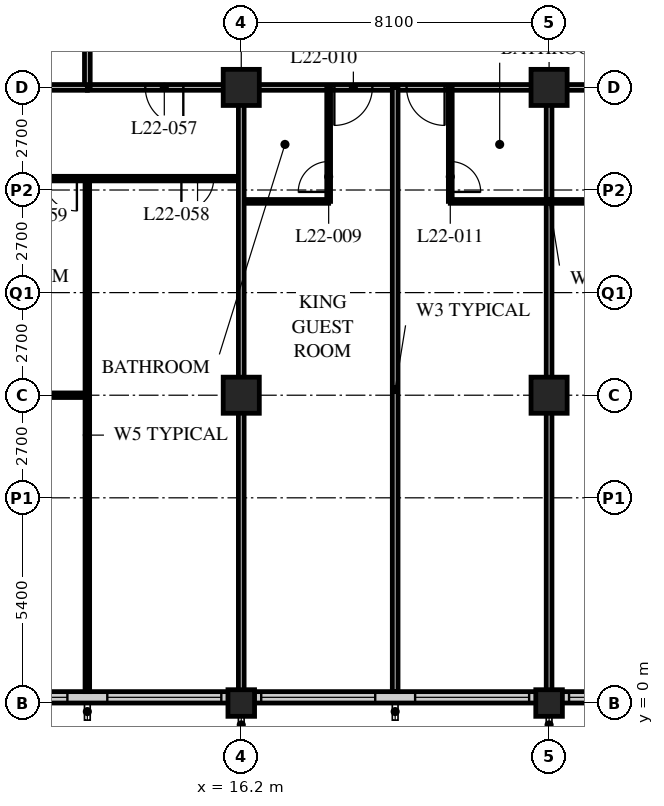
"""IFC4 building model, lengths in metres.
Left out: names, types, materials, properties, quantities, classifications, styles, units other than length and angle.
Written with IfcOpenShell. Run it as: python <this file> out.ifc"""

import sys

from ifc_helpers import new_model, si_unit, direction, frame, frame_2d, origin, origin_2d, place, context, subcontext, project, spatial, rectangle, hollow_rectangle, extrude, element, fill, save


model = new_model("IFC4")
c1 = context("Model", 3, precision=1e-05, world=origin(), true_north=direction((0.0, 1.0)))
c2 = subcontext(c1, "Body", "Model", "MODEL_VIEW")
j1 = project(units=[si_unit("LENGTHUNIT", "METRE"), si_unit("PLANEANGLEUNIT", "RADIAN")], contexts=[c1])
p1 = place(None, origin())
s1 = spatial("IfcSite", under=j1, at=p1, CompositionType="ELEMENT")
p2 = place(p1, origin())
s2 = spatial("IfcBuilding", under=s1, at=p2, CompositionType="ELEMENT")
p3 = place(p2, frame((0.0, 0.0, 87.4)))
s3 = spatial("IfcBuildingStorey", under=s2, at=p3, CompositionType="ELEMENT", Elevation=87.4)
p4 = place(p3, frame((16.2, 0.0, 0.0), z_axis=(0.0, 0.0, 1.0), x_axis=(1.0, 0.0, 0.0)))
e1 = element("IfcColumn", 1, at=p4, inside=s3, PredefinedType="COLUMN", context=c2, shape_type="SweptSolid", body=[
    extrude(hollow_rectangle(XDim=0.7, YDim=0.7, WallThickness=0.06, at=origin_2d()), origin(), (0.0, 0.0, 1.0), 3.4),
])
for number, where, z_axis, x_axis in (
    (2, (16.2, 8.1, 0.0), (0.0, 0.0, 1.0), (1.0, 0.0, 0.0)),
    (3, (16.2, 16.2, 0.0), (0.0, 0.0, 1.0), (1.0, 0.0, 0.0)),
):
    element("IfcColumn", number, at=place(p3, frame(where, z_axis=z_axis, x_axis=x_axis)), inside=s3, PredefinedType="COLUMN", context=c2, shape_type="SweptSolid", body=[
        extrude(hollow_rectangle(XDim=0.95, YDim=0.95, WallThickness=0.095, at=origin_2d()), origin(), (0.0, 0.0, 1.0), 3.4),
    ])
p5 = place(p3, frame((24.3, 0.0, 0.0), z_axis=(0.0, 0.0, 1.0), x_axis=(1.0, 0.0, 0.0)))
e4 = element("IfcColumn", 4, at=p5, inside=s3, PredefinedType="COLUMN", context=c2, shape_type="SweptSolid", body=[
    extrude(hollow_rectangle(XDim=0.7, YDim=0.7, WallThickness=0.06, at=origin_2d()), origin(), (0.0, 0.0, 1.0), 3.4),
])
for number, where, z_axis, x_axis in (
    (5, (24.3, 8.1, 0.0), (0.0, 0.0, 1.0), (1.0, 0.0, 0.0)),
    (6, (24.3, 16.2, 0.0), (0.0, 0.0, 1.0), (1.0, 0.0, 0.0)),
):
    element("IfcColumn", number, at=place(p3, frame(where, z_axis=z_axis, x_axis=x_axis)), inside=s3, PredefinedType="COLUMN", context=c2, shape_type="SweptSolid", body=[
        extrude(hollow_rectangle(XDim=0.95, YDim=0.95, WallThickness=0.095, at=origin_2d()), origin(), (0.0, 0.0, 1.0), 3.4),
    ])
p6 = place(p3, frame((8.4, 0.15, 0.0), z_axis=(0.0, 0.0, 1.0), x_axis=(1.0, 0.0, 0.0)))
e7 = element("IfcWall", 7, at=p6, inside=s3, PredefinedType="SOLIDWALL", context=c2, shape_type="SweptSolid", body=[
    extrude(rectangle(XDim=40.2, YDim=0.3, at=frame_2d((20.1, 0.0))), origin(), (0.0, 0.0, 1.0), 2.05),
])
p7 = place(p6, frame((0.225, 0.0, 0.9)))
e8 = element("IfcOpeningElement", 8, at=p7, cuts=e7, PredefinedType="OPENING", context=c2, shape_type="SweptSolid", body=[
    extrude(rectangle(XDim=3.0, YDim=1.1, at=frame_2d((1.5, 0.55))), frame((0.0, 0.16, 0.0), z_axis=(0.0, -1.0, 0.0), x_axis=(1.0, 0.0, 0.0)), (0.0, 0.0, 1.0), 0.32),
])
p8 = place(p6, frame((4.275, 0.0, 0.9)))
e9 = element("IfcOpeningElement", 9, at=p8, cuts=e7, PredefinedType="OPENING", context=c2, shape_type="SweptSolid", body=[
    extrude(rectangle(XDim=3.0, YDim=1.1, at=frame_2d((1.5, 0.55))), frame((0.0, 0.16, 0.0), z_axis=(0.0, -1.0, 0.0), x_axis=(1.0, 0.0, 0.0)), (0.0, 0.0, 1.0), 0.32),
])
p9 = place(p6, frame((8.325, 0.0, 0.9)))
e10 = element("IfcOpeningElement", 10, at=p9, cuts=e7, PredefinedType="OPENING", context=c2, shape_type="SweptSolid", body=[
    extrude(rectangle(XDim=3.0, YDim=1.1, at=frame_2d((1.5, 0.55))), frame((0.0, 0.16, 0.0), z_axis=(0.0, -1.0, 0.0), x_axis=(1.0, 0.0, 0.0)), (0.0, 0.0, 1.0), 0.32),
])
p10 = place(p6, frame((12.375, 0.0, 0.9)))
e11 = element("IfcOpeningElement", 11, at=p10, cuts=e7, PredefinedType="OPENING", context=c2, shape_type="SweptSolid", body=[
    extrude(rectangle(XDim=3.0, YDim=1.1, at=frame_2d((1.5, 0.55))), frame((0.0, 0.16, 0.0), z_axis=(0.0, -1.0, 0.0), x_axis=(1.0, 0.0, 0.0)), (0.0, 0.0, 1.0), 0.32),
])
p11 = place(p6, frame((16.425, 0.0, 0.9)))
e12 = element("IfcOpeningElement", 12, at=p11, cuts=e7, PredefinedType="OPENING", context=c2, shape_type="SweptSolid", body=[
    extrude(rectangle(XDim=3.0, YDim=1.1, at=frame_2d((1.5, 0.55))), frame((0.0, 0.16, 0.0), z_axis=(0.0, -1.0, 0.0), x_axis=(1.0, 0.0, 0.0)), (0.0, 0.0, 1.0), 0.32),
])
p12 = place(p6, frame((20.475, 0.0, 0.9)))
e13 = element("IfcOpeningElement", 13, at=p12, cuts=e7, PredefinedType="OPENING", context=c2, shape_type="SweptSolid", body=[
    extrude(rectangle(XDim=3.0, YDim=1.1, at=frame_2d((1.5, 0.55))), frame((0.0, 0.16, 0.0), z_axis=(0.0, -1.0, 0.0), x_axis=(1.0, 0.0, 0.0)), (0.0, 0.0, 1.0), 0.32),
])
p13 = place(p6, frame((24.525, 0.0, 0.9)))
e14 = element("IfcOpeningElement", 14, at=p13, cuts=e7, PredefinedType="OPENING", context=c2, shape_type="SweptSolid", body=[
    extrude(rectangle(XDim=3.0, YDim=1.1, at=frame_2d((1.5, 0.55))), frame((0.0, 0.16, 0.0), z_axis=(0.0, -1.0, 0.0), x_axis=(1.0, 0.0, 0.0)), (0.0, 0.0, 1.0), 0.32),
])
p14 = place(p6, frame((28.575, 0.0, 0.9)))
e15 = element("IfcOpeningElement", 15, at=p14, cuts=e7, PredefinedType="OPENING", context=c2, shape_type="SweptSolid", body=[
    extrude(rectangle(XDim=3.0, YDim=1.1, at=frame_2d((1.5, 0.55))), frame((0.0, 0.16, 0.0), z_axis=(0.0, -1.0, 0.0), x_axis=(1.0, 0.0, 0.0)), (0.0, 0.0, 1.0), 0.32),
])
p15 = place(p6, frame((32.625, 0.0, 0.9)))
e16 = element("IfcOpeningElement", 16, at=p15, cuts=e7, PredefinedType="OPENING", context=c2, shape_type="SweptSolid", body=[
    extrude(rectangle(XDim=3.0, YDim=1.1, at=frame_2d((1.5, 0.55))), frame((0.0, 0.16, 0.0), z_axis=(0.0, -1.0, 0.0), x_axis=(1.0, 0.0, 0.0)), (0.0, 0.0, 1.0), 0.32),
])
p16 = place(p6, frame((36.675, 0.0, 0.9)))
e17 = element("IfcOpeningElement", 17, at=p16, cuts=e7, PredefinedType="OPENING", context=c2, shape_type="SweptSolid", body=[
    extrude(rectangle(XDim=3.0, YDim=1.1, at=frame_2d((1.5, 0.55))), frame((0.0, 0.16, 0.0), z_axis=(0.0, -1.0, 0.0), x_axis=(1.0, 0.0, 0.0)), (0.0, 0.0, 1.0), 0.32),
])
p17 = place(p3, frame((12.15, 16.2, 0.0), z_axis=(0.0, 0.0, 1.0), x_axis=(1.0, 0.0, 0.0)))
e18 = element("IfcWall", 18, at=p17, inside=s3, PredefinedType="PARTITIONING", context=c2, shape_type="SweptSolid", body=[
    extrude(rectangle(XDim=32.4, YDim=0.15, at=frame_2d((16.2, 0.0))), origin(), (0.0, 0.0, 1.0), 2.388),
])
p18 = place(p17, frame((6.5, 0.0, 0.0)))
e19 = element("IfcOpeningElement", 19, at=p18, cuts=e18, PredefinedType="OPENING", context=c2, shape_type="SweptSolid", body=[
    extrude(rectangle(XDim=1.0, YDim=2.1, at=frame_2d((0.5, 1.05))), frame((0.0, 0.085, 0.0), z_axis=(0.0, -1.0, 0.0), x_axis=(1.0, 0.0, 0.0)), (0.0, 0.0, 1.0), 0.17),
])
p19 = place(p17, frame((8.4, 0.0, 0.0)))
e20 = element("IfcOpeningElement", 20, at=p19, cuts=e18, PredefinedType="OPENING", context=c2, shape_type="SweptSolid", body=[
    extrude(rectangle(XDim=1.0, YDim=2.1, at=frame_2d((0.5, 1.05))), frame((0.0, 0.085, 0.0), z_axis=(0.0, -1.0, 0.0), x_axis=(1.0, 0.0, 0.0)), (0.0, 0.0, 1.0), 0.17),
])
p20 = place(p17, frame((14.9, 0.0, 0.0)))
e21 = element("IfcOpeningElement", 21, at=p20, cuts=e18, PredefinedType="OPENING", context=c2, shape_type="SweptSolid", body=[
    extrude(rectangle(XDim=1.0, YDim=2.1, at=frame_2d((0.5, 1.05))), frame((0.0, 0.085, 0.0), z_axis=(0.0, -1.0, 0.0), x_axis=(1.0, 0.0, 0.0)), (0.0, 0.0, 1.0), 0.17),
])
p21 = place(p17, frame((16.5, 0.0, 0.0)))
e22 = element("IfcOpeningElement", 22, at=p21, cuts=e18, PredefinedType="OPENING", context=c2, shape_type="SweptSolid", body=[
    extrude(rectangle(XDim=1.0, YDim=2.1, at=frame_2d((0.5, 1.05))), frame((0.0, 0.085, 0.0), z_axis=(0.0, -1.0, 0.0), x_axis=(1.0, 0.0, 0.0)), (0.0, 0.0, 1.0), 0.17),
])
p22 = place(p17, frame((23.0, 0.0, 0.0)))
e23 = element("IfcOpeningElement", 23, at=p22, cuts=e18, PredefinedType="OPENING", context=c2, shape_type="SweptSolid", body=[
    extrude(rectangle(XDim=1.0, YDim=2.1, at=frame_2d((0.5, 1.05))), frame((0.0, 0.085, 0.0), z_axis=(0.0, -1.0, 0.0), x_axis=(1.0, 0.0, 0.0)), (0.0, 0.0, 1.0), 0.17),
])
p23 = place(p17, frame((24.9, 0.0, 0.0)))
e24 = element("IfcOpeningElement", 24, at=p23, cuts=e18, PredefinedType="OPENING", context=c2, shape_type="SweptSolid", body=[
    extrude(rectangle(XDim=1.0, YDim=2.1, at=frame_2d((0.5, 1.05))), frame((0.0, 0.085, 0.0), z_axis=(0.0, -1.0, 0.0), x_axis=(1.0, 0.0, 0.0)), (0.0, 0.0, 1.0), 0.17),
])
p24 = place(p17, frame((1.525, 0.0, 0.0)))
e25 = element("IfcOpeningElement", 25, at=p24, cuts=e18, PredefinedType="OPENING", context=c2, shape_type="SweptSolid", body=[
    extrude(rectangle(XDim=1.0, YDim=2.1, at=frame_2d((0.5, 1.05))), frame((0.0, 0.085, 0.0), z_axis=(0.0, -1.0, 0.0), x_axis=(1.0, 0.0, 0.0)), (0.0, 0.0, 1.0), 0.17),
])
p25 = place(p17, frame((29.875, 0.0, 0.0)))
e26 = element("IfcOpeningElement", 26, at=p25, cuts=e18, PredefinedType="OPENING", context=c2, shape_type="SweptSolid", body=[
    extrude(rectangle(XDim=1.0, YDim=2.1, at=frame_2d((0.5, 1.05))), frame((0.0, 0.085, 0.0), z_axis=(0.0, -1.0, 0.0), x_axis=(1.0, 0.0, 0.0)), (0.0, 0.0, 1.0), 0.17),
])
p26 = place(p3, frame((12.15, 16.2, 0.0), z_axis=(0.0, 0.0, 1.0), x_axis=(0.0, 1.0, 0.0)))
e27 = element("IfcWall", 27, at=p26, inside=s3, PredefinedType="PARTITIONING", context=c2, shape_type="SweptSolid", body=[
    extrude(rectangle(XDim=26.1, YDim=0.15, at=frame_2d((13.05, 0.0))), origin(), (0.0, 0.0, 1.0), 3.15),
])
p27 = place(p26, frame((2.45, 0.0, 0.0)))
e28 = element("IfcOpeningElement", 28, at=p27, cuts=e27, PredefinedType="OPENING", context=c2, shape_type="SweptSolid", body=[
    extrude(rectangle(XDim=1.0, YDim=2.1, at=frame_2d((0.5, 1.05))), frame((0.0, 0.085, 0.0), z_axis=(0.0, -1.0, 0.0), x_axis=(1.0, 0.0, 0.0)), (0.0, 0.0, 1.0), 0.17),
])
p28 = place(p26, frame((6.5, 0.0, 0.0)))
e29 = element("IfcOpeningElement", 29, at=p28, cuts=e27, PredefinedType="OPENING", context=c2, shape_type="SweptSolid", body=[
    extrude(rectangle(XDim=1.0, YDim=2.1, at=frame_2d((0.5, 1.05))), frame((0.0, 0.085, 0.0), z_axis=(0.0, -1.0, 0.0), x_axis=(1.0, 0.0, 0.0)), (0.0, 0.0, 1.0), 0.17),
])
p29 = place(p26, frame((10.0, 0.0, 0.0)))
e30 = element("IfcOpeningElement", 30, at=p29, cuts=e27, PredefinedType="OPENING", context=c2, shape_type="SweptSolid", body=[
    extrude(rectangle(XDim=1.0, YDim=2.1, at=frame_2d((0.5, 1.05))), frame((0.0, 0.085, 0.0), z_axis=(0.0, -1.0, 0.0), x_axis=(1.0, 0.0, 0.0)), (0.0, 0.0, 1.0), 0.17),
])
p30 = place(p26, frame((18.1, 0.0, 0.0)))
e31 = element("IfcOpeningElement", 31, at=p30, cuts=e27, PredefinedType="OPENING", context=c2, shape_type="SweptSolid", body=[
    extrude(rectangle(XDim=1.0, YDim=2.1, at=frame_2d((0.5, 1.05))), frame((0.0, 0.085, 0.0), z_axis=(0.0, -1.0, 0.0), x_axis=(1.0, 0.0, 0.0)), (0.0, 0.0, 1.0), 0.17),
])
p31 = place(p3, frame((16.2, 13.2, 0.0), z_axis=(0.0, 0.0, 1.0), x_axis=(1.0, 0.0, 0.0)))
e32 = element("IfcWall", 32, at=p31, inside=s3, PredefinedType="PARTITIONING", context=c2, shape_type="SweptSolid", body=[
    extrude(rectangle(XDim=2.3, YDim=0.1, at=frame_2d((1.15, 0.0))), origin(), (0.0, 0.0, 1.0), 3.15),
])
p32 = place(p3, frame((18.5, 16.2, 0.0), z_axis=(0.0, 0.0, 1.0), x_axis=(0.0, -1.0, 0.0)))
e33 = element("IfcWall", 33, at=p32, inside=s3, PredefinedType="PARTITIONING", context=c2, shape_type="SweptSolid", body=[
    extrude(rectangle(XDim=3.0, YDim=0.1, at=frame_2d((1.5, 0.0))), origin(), (0.0, 0.0, 1.0), 3.15),
])
p33 = place(p32, frame((1.95, 0.0, 0.0)))
e34 = element("IfcOpeningElement", 34, at=p33, cuts=e33, PredefinedType="OPENING", context=c2, shape_type="SweptSolid", body=[
    extrude(rectangle(XDim=0.8, YDim=2.1, at=frame_2d((0.4, 1.05))), frame((0.0, 0.06, 0.0), z_axis=(0.0, -1.0, 0.0), x_axis=(1.0, 0.0, 0.0)), (0.0, 0.0, 1.0), 0.12),
])
p34 = place(p3, frame((20.25, 16.2, 0.0), z_axis=(0.0, 0.0, 1.0), x_axis=(0.0, -1.0, 0.0)))
e35 = element("IfcWall", 35, at=p34, inside=s3, PredefinedType="PARTITIONING", context=c2, shape_type="SweptSolid", body=[
    extrude(rectangle(XDim=15.9, YDim=0.15, at=frame_2d((7.95, 0.0))), origin(), (0.0, 0.0, 1.0), 3.15),
])
p35 = place(p3, frame((21.7, 13.2, 0.0), z_axis=(0.0, 0.0, 1.0), x_axis=(1.0, 0.0, 0.0)))
e36 = element("IfcWall", 36, at=p35, inside=s3, PredefinedType="PARTITIONING", context=c2, shape_type="SweptSolid", body=[
    extrude(rectangle(XDim=5.2, YDim=0.1, at=frame_2d((2.6, 0.0))), origin(), (0.0, 0.0, 1.0), 3.15),
])
p36 = place(p3, frame((21.7, 16.2, 0.0), z_axis=(0.0, 0.0, 1.0), x_axis=(0.0, -1.0, 0.0)))
e37 = element("IfcWall", 37, at=p36, inside=s3, PredefinedType="PARTITIONING", context=c2, shape_type="SweptSolid", body=[
    extrude(rectangle(XDim=3.0, YDim=0.1, at=frame_2d((1.5, 0.0))), origin(), (0.0, 0.0, 1.0), 3.15),
])
p37 = place(p36, frame((1.95, 0.0, 0.0)))
e38 = element("IfcOpeningElement", 38, at=p37, cuts=e37, PredefinedType="OPENING", context=c2, shape_type="SweptSolid", body=[
    extrude(rectangle(XDim=0.8, YDim=2.1, at=frame_2d((0.4, 1.05))), frame((0.0, 0.06, 0.0), z_axis=(0.0, -1.0, 0.0), x_axis=(1.0, 0.0, 0.0)), (0.0, 0.0, 1.0), 0.12),
])
p38 = place(p3, frame((24.3, 16.2, 0.0), z_axis=(0.0, 0.0, 1.0), x_axis=(0.0, -1.0, 0.0)))
e39 = element("IfcWall", 39, at=p38, inside=s3, PredefinedType="PARTITIONING", context=c2, shape_type="SweptSolid", body=[
    extrude(rectangle(XDim=15.9, YDim=0.15, at=frame_2d((7.95, 0.0))), origin(), (0.0, 0.0, 1.0), 2.05),
])
p39 = place(p3, frame((8.15, 13.8, 0.0), z_axis=(0.0, 0.0, 1.0), x_axis=(1.0, 0.0, 0.0)))
e40 = element("IfcWall", 40, at=p39, inside=s3, PredefinedType="PARTITIONING", context=c2, shape_type="SweptSolid", body=[
    extrude(rectangle(XDim=8.05, YDim=0.12, at=frame_2d((4.025, 0.0))), origin(), (0.0, 0.0, 1.0), 3.15),
])
p40 = place(p39, frame((6.475, 0.0, 0.0)))
e41 = element("IfcOpeningElement", 41, at=p40, cuts=e40, PredefinedType="OPENING", context=c2, shape_type="SweptSolid", body=[
    extrude(rectangle(XDim=0.85, YDim=2.1, at=frame_2d((0.425, 1.05))), frame((0.0, 0.07, 0.0), z_axis=(0.0, -1.0, 0.0), x_axis=(1.0, 0.0, 0.0)), (0.0, 0.0, 1.0), 0.14),
])
p41 = place(p39, frame((2.875, 0.0, 0.0)))
e42 = element("IfcOpeningElement", 42, at=p41, cuts=e40, PredefinedType="OPENING", context=c2, shape_type="SweptSolid", body=[
    extrude(rectangle(XDim=0.85, YDim=2.1, at=frame_2d((0.425, 1.05))), frame((0.0, 0.07, 0.0), z_axis=(0.0, -1.0, 0.0), x_axis=(1.0, 0.0, 0.0)), (0.0, 0.0, 1.0), 0.14),
])
p42 = place(p3, frame((12.15, 13.8, 0.0), z_axis=(0.0, 0.0, 1.0), x_axis=(0.0, -1.0, 0.0)))
e43 = element("IfcWall", 43, at=p42, inside=s3, PredefinedType="PARTITIONING", context=c2, shape_type="SweptSolid", body=[
    extrude(rectangle(XDim=13.5, YDim=0.12, at=frame_2d((6.75, 0.0))), origin(), (0.0, 0.0, 1.0), 3.15),
])
p43 = place(p3, frame((0.3, 16.2, 0.0), z_axis=(0.0, 0.0, 1.0), x_axis=(1.0, 0.0, 0.0)))
e44 = element("IfcWall", 44, at=p43, inside=s3, PredefinedType="PARTITIONING", context=c2, shape_type="SweptSolid", body=[
    extrude(rectangle(XDim=11.85, YDim=0.15, at=frame_2d((5.925, 0.0))), origin(), (0.0, 0.0, 1.0), 2.388),
])
p44 = place(p3, frame((16.2, 16.2, 0.0), z_axis=(0.0, 0.0, 1.0), x_axis=(0.0, -1.0, 0.0)))
e45 = element("IfcWall", 45, at=p44, inside=s3, PredefinedType="PARTITIONING", context=c2, shape_type="SweptSolid", body=[
    extrude(rectangle(XDim=15.9, YDim=0.15, at=frame_2d((7.95, 0.0))), origin(), (0.0, 0.0, 1.0), 2.05),
])
p45 = place(p3, frame((12.15, 8.1, 0.0), z_axis=(0.0, 0.0, 1.0), x_axis=(-1.0, 0.0, 0.0)))
e46 = element("IfcWall", 46, at=p45, inside=s3, PredefinedType="PARTITIONING", context=c2, shape_type="SweptSolid", body=[
    extrude(rectangle(XDim=3.575, YDim=0.12, at=frame_2d((1.788, 0.0))), origin(), (0.0, 0.0, 1.0), 2.388),
])
p46 = place(p7, origin())
e47 = element("IfcWindow", 47, at=p46, inside=s3, PartitioningType="SINGLE_PANEL", PredefinedType="WINDOW", context=c2, shape_type="SweptSolid", body=[
    extrude(rectangle(XDim=3.0, YDim=1.1, at=frame_2d((1.5, 0.55))), frame((0.0, 0.03, 0.0), z_axis=(0.0, -1.0, 0.0), x_axis=(1.0, 0.0, 0.0)), (0.0, 0.0, 1.0), 0.06),
])
fill(e8, e47)
p47 = place(p8, origin())
e48 = element("IfcWindow", 48, at=p47, inside=s3, PartitioningType="SINGLE_PANEL", PredefinedType="WINDOW", context=c2, shape_type="SweptSolid", body=[
    extrude(rectangle(XDim=3.0, YDim=1.1, at=frame_2d((1.5, 0.55))), frame((0.0, 0.03, 0.0), z_axis=(0.0, -1.0, 0.0), x_axis=(1.0, 0.0, 0.0)), (0.0, 0.0, 1.0), 0.06),
])
fill(e9, e48)
p48 = place(p9, origin())
e49 = element("IfcWindow", 49, at=p48, inside=s3, PartitioningType="SINGLE_PANEL", PredefinedType="WINDOW", context=c2, shape_type="SweptSolid", body=[
    extrude(rectangle(XDim=3.0, YDim=1.1, at=frame_2d((1.5, 0.55))), frame((0.0, 0.03, 0.0), z_axis=(0.0, -1.0, 0.0), x_axis=(1.0, 0.0, 0.0)), (0.0, 0.0, 1.0), 0.06),
])
fill(e10, e49)
p49 = place(p10, origin())
e50 = element("IfcWindow", 50, at=p49, inside=s3, PartitioningType="SINGLE_PANEL", PredefinedType="WINDOW", context=c2, shape_type="SweptSolid", body=[
    extrude(rectangle(XDim=3.0, YDim=1.1, at=frame_2d((1.5, 0.55))), frame((0.0, 0.03, 0.0), z_axis=(0.0, -1.0, 0.0), x_axis=(1.0, 0.0, 0.0)), (0.0, 0.0, 1.0), 0.06),
])
fill(e11, e50)
p50 = place(p11, origin())
e51 = element("IfcWindow", 51, at=p50, inside=s3, PartitioningType="SINGLE_PANEL", PredefinedType="WINDOW", context=c2, shape_type="SweptSolid", body=[
    extrude(rectangle(XDim=3.0, YDim=1.1, at=frame_2d((1.5, 0.55))), frame((0.0, 0.03, 0.0), z_axis=(0.0, -1.0, 0.0), x_axis=(1.0, 0.0, 0.0)), (0.0, 0.0, 1.0), 0.06),
])
fill(e12, e51)
p51 = place(p33, origin())
e52 = element("IfcDoor", 52, at=p51, inside=s3, OperationType="SINGLE_SWING_LEFT", PredefinedType="DOOR", context=c2, shape_type="SweptSolid", body=[
    extrude(rectangle(XDim=0.8, YDim=2.1, at=frame_2d((0.4, 1.05))), frame((0.0, 0.025, 0.0), z_axis=(0.0, -1.0, 0.0), x_axis=(1.0, 0.0, 0.0)), (0.0, 0.0, 1.0), 0.05),
])
fill(e34, e52)
p52 = place(p18, origin())
e53 = element("IfcDoor", 53, at=p52, inside=s3, OperationType="SINGLE_SWING_RIGHT", PredefinedType="DOOR", context=c2, shape_type="SweptSolid", body=[
    extrude(rectangle(XDim=1.0, YDim=2.1, at=frame_2d((0.5, 1.05))), frame((0.0, 0.025, 0.0), z_axis=(0.0, -1.0, 0.0), x_axis=(1.0, 0.0, 0.0)), (0.0, 0.0, 1.0), 0.05),
])
fill(e19, e53)
p53 = place(p37, origin())
e54 = element("IfcDoor", 54, at=p53, inside=s3, OperationType="SINGLE_SWING_RIGHT", PredefinedType="DOOR", context=c2, shape_type="SweptSolid", body=[
    extrude(rectangle(XDim=0.8, YDim=2.1, at=frame_2d((0.4, 1.05))), frame((0.0, 0.025, 0.0), z_axis=(0.0, -1.0, 0.0), x_axis=(1.0, 0.0, 0.0)), (0.0, 0.0, 1.0), 0.05),
])
fill(e38, e54)
p54 = place(p19, origin())
e55 = element("IfcDoor", 55, at=p54, inside=s3, OperationType="SINGLE_SWING_LEFT", PredefinedType="DOOR", context=c2, shape_type="SweptSolid", body=[
    extrude(rectangle(XDim=1.0, YDim=2.1, at=frame_2d((0.5, 1.05))), frame((0.0, 0.025, 0.0), z_axis=(0.0, -1.0, 0.0), x_axis=(1.0, 0.0, 0.0)), (0.0, 0.0, 1.0), 0.05),
])
fill(e20, e55)
p55 = place(p24, origin())
e56 = element("IfcDoor", 56, at=p55, inside=s3, OperationType="SINGLE_SWING_LEFT", PredefinedType="DOOR", context=c2, shape_type="SweptSolid", body=[
    extrude(rectangle(XDim=1.0, YDim=2.1, at=frame_2d((0.5, 1.05))), frame((0.0, 0.025, 0.0), z_axis=(0.0, -1.0, 0.0), x_axis=(1.0, 0.0, 0.0)), (0.0, 0.0, 1.0), 0.05),
])
fill(e25, e56)
p56 = place(p40, origin())
e57 = element("IfcDoor", 57, at=p56, inside=s3, OperationType="SINGLE_SWING_RIGHT", PredefinedType="DOOR", context=c2, shape_type="SweptSolid", body=[
    extrude(rectangle(XDim=0.85, YDim=2.1, at=frame_2d((0.425, 1.05))), frame((0.0, 0.025, 0.0), z_axis=(0.0, -1.0, 0.0), x_axis=(1.0, 0.0, 0.0)), (0.0, 0.0, 1.0), 0.05),
])
fill(e41, e57)
p57 = place(p41, origin())
e58 = element("IfcDoor", 58, at=p57, inside=s3, OperationType="SINGLE_SWING_LEFT", PredefinedType="DOOR", context=c2, shape_type="SweptSolid", body=[
    extrude(rectangle(XDim=0.85, YDim=2.1, at=frame_2d((0.425, 1.05))), frame((0.0, 0.025, 0.0), z_axis=(0.0, -1.0, 0.0), x_axis=(1.0, 0.0, 0.0)), (0.0, 0.0, 1.0), 0.05),
])
fill(e42, e58)
save(model, sys.argv[1])
